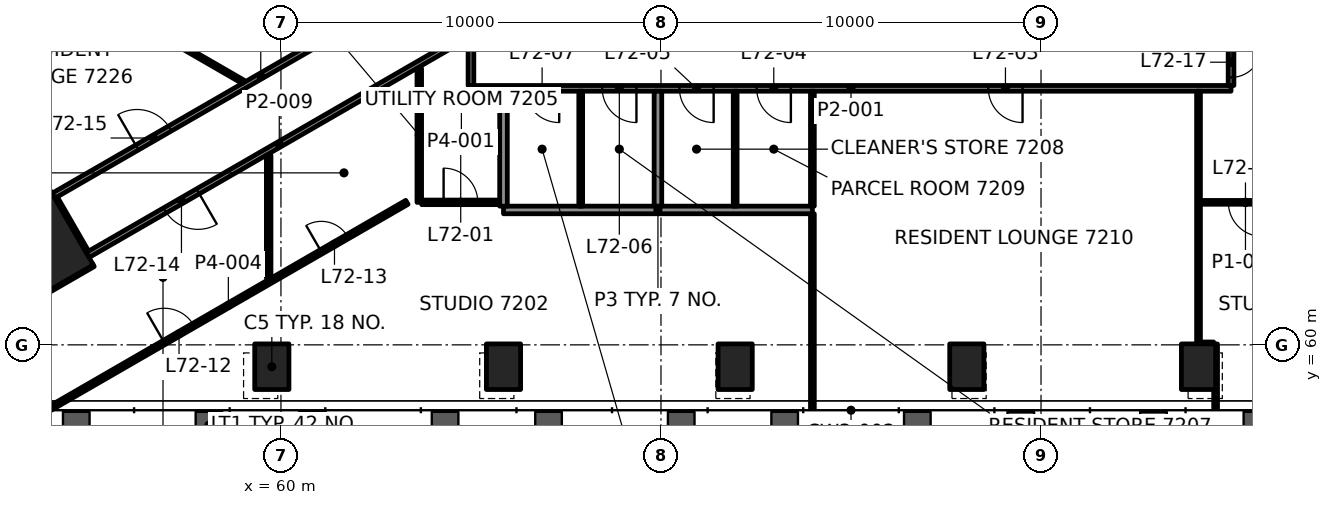
"""IFC4 building model, lengths in metres.
Left out: names, types, materials, properties, quantities, classifications, styles, units other than length and angle.
Written with IfcOpenShell. Run it as: python <this file> out.ifc"""

import sys

from ifc_helpers import new_model, si_unit, direction, frame, frame_2d, origin, origin_2d, place, context, subcontext, project, spatial, rectangle, hollow_rectangle, extrude, element, fill, save


model = new_model("IFC4")
c1 = context("Model", 3, precision=1e-05, world=origin(), true_north=direction((0.0, 1.0)))
c2 = subcontext(c1, "Body", "Model", "MODEL_VIEW")
j1 = project(units=[si_unit("LENGTHUNIT", "METRE"), si_unit("PLANEANGLEUNIT", "RADIAN")], contexts=[c1])
p1 = place(None, origin())
s1 = spatial("IfcSite", under=j1, at=p1, CompositionType="ELEMENT")
p2 = place(p1, origin())
s2 = spatial("IfcBuilding", under=s1, at=p2, CompositionType="ELEMENT")
p3 = place(p2, frame((0.0, 0.0, 298.6)))
s3 = spatial("IfcBuildingStorey", under=s2, at=p3, CompositionType="ELEMENT", Elevation=298.6)
p4 = place(p3, frame((53.423, 62.542, 0.0), z_axis=(0.0, 0.0, 1.0), x_axis=(0.5, -0.866025403784, 0.0)))
e1 = element("IfcColumn", 1, at=p4, inside=s3, PredefinedType="COLUMN", context=c2, shape_type="SweptSolid", body=[
    extrude(rectangle(XDim=2.4, YDim=2.4, at=origin_2d()), origin(), (0.0, 0.0, 1.0), 3.5),
])
for number, where, z_axis, x_axis in (
    (2, (59.76, 59.425, -0.0), (0.0, 0.0, 1.0), (1.0, 0.0, 0.0)),
    (3, (65.856, 59.425, -0.0), (0.0, 0.0, 1.0), (1.0, 0.0, 0.0)),
    (4, (71.952, 59.425, -0.0), (0.0, 0.0, 1.0), (1.0, 0.0, 0.0)),
    (5, (78.048, 59.425, -0.0), (0.0, 0.0, 1.0), (1.0, 0.0, 0.0)),
    (6, (84.144, 59.425, -0.0), (0.0, 0.0, 1.0), (1.0, 0.0, 0.0)),
):
    element("IfcColumn", number, at=place(p3, frame(where, z_axis=z_axis, x_axis=x_axis)), inside=s3, PredefinedType="COLUMN", context=c2, shape_type="SweptSolid", body=[
        extrude(hollow_rectangle(XDim=0.9, YDim=1.2, WallThickness=0.06, at=origin_2d()), origin(), (0.0, 0.0, 1.0), 3.5),
    ])
p5 = place(p3, frame((84.194, 60.025, 0.0), z_axis=(0.0, 0.0, 1.0), x_axis=(1.0, 0.0, 0.0)))
e7 = element("IfcWall", 7, at=p5, inside=s3, PredefinedType="PARTITIONING", context=c2, shape_type="SweptSolid", body=[
    extrude(rectangle(XDim=0.347, YDim=0.1, at=frame_2d((0.173, 0.0))), origin(), (0.0, 0.0, 1.0), 2.7),
])
p6 = place(p3, frame((65.856, 63.55, 0.0), z_axis=(0.0, 0.0, 1.0), x_axis=(1.0, 0.0, 0.0)))
e8 = element("IfcWall", 8, at=p6, inside=s3, PredefinedType="PARTITIONING", context=c2, shape_type="SweptSolid", body=[
    extrude(rectangle(XDim=8.128, YDim=0.2, at=frame_2d((4.064, 0.0))), origin(), (0.0, 0.0, 1.0), 2.7),
])
p7 = place(p3, frame((63.704, 63.75, 0.0), z_axis=(0.0, 0.0, 1.0), x_axis=(1.0, 0.0, 0.0)))
e9 = element("IfcWall", 9, at=p7, inside=s3, PredefinedType="PARTITIONING", context=c2, shape_type="SweptSolid", body=[
    extrude(rectangle(XDim=2.052, YDim=0.12, at=frame_2d((1.026, 0.0))), origin(), (0.0, 0.0, 1.0), 2.7),
])
p8 = place(p7, frame((0.576, 0.0, 0.0)))
e10 = element("IfcOpeningElement", 10, at=p8, cuts=e9, PredefinedType="OPENING", context=c2, shape_type="SweptSolid", body=[
    extrude(rectangle(XDim=0.9, YDim=2.1, at=frame_2d((0.45, 1.05))), frame((0.0, 0.07, 0.0), z_axis=(0.0, -1.0, 0.0), x_axis=(1.0, 0.0, 0.0)), (0.0, 0.0, 1.0), 0.14),
])
p9 = place(p3, frame((86.566, 63.75, 0.0), z_axis=(0.0, 0.0, 1.0), x_axis=(-1.0, 0.0, 0.0)))
e11 = element("IfcWall", 11, at=p9, inside=s3, PredefinedType="PARTITIONING", context=c2, shape_type="SweptSolid", body=[
    extrude(rectangle(XDim=2.372, YDim=0.1, at=frame_2d((1.186, 0.0))), origin(), (0.0, 0.0, 1.0), 2.7),
])
p10 = place(p9, frame((0.736, 0.0, 0.0)))
e12 = element("IfcOpeningElement", 12, at=p10, cuts=e11, PredefinedType="OPENING", context=c2, shape_type="SweptSolid", body=[
    extrude(rectangle(XDim=0.9, YDim=2.1, at=frame_2d((0.45, 1.05))), frame((0.0, 0.06, 0.0), z_axis=(0.0, -1.0, 0.0), x_axis=(1.0, 0.0, 0.0)), (0.0, 0.0, 1.0), 0.12),
])
p11 = place(p3, frame((85.0, 66.75, 0.0), z_axis=(0.0, 0.0, 1.0), x_axis=(-1.0, 0.0, 0.0)))
e13 = element("IfcWall", 13, at=p11, inside=s3, PredefinedType="PARTITIONING", context=c2, shape_type="SweptSolid", body=[
    extrude(rectangle(XDim=20.0, YDim=0.15, at=frame_2d((10.0, 0.0))), origin(), (0.0, 0.0, 1.0), 2.7),
])
p12 = place(p11, frame((5.486, 0.0, 0.0)))
e14 = element("IfcOpeningElement", 14, at=p12, cuts=e13, PredefinedType="OPENING", context=c2, shape_type="SweptSolid", body=[
    extrude(rectangle(XDim=0.9, YDim=2.1, at=frame_2d((0.45, 1.05))), frame((0.0, 0.085, 0.0), z_axis=(0.0, -1.0, 0.0), x_axis=(1.0, 0.0, 0.0)), (0.0, 0.0, 1.0), 0.17),
])
p13 = place(p11, frame((11.582, 0.0, 0.0)))
e15 = element("IfcOpeningElement", 15, at=p13, cuts=e13, PredefinedType="OPENING", context=c2, shape_type="SweptSolid", body=[
    extrude(rectangle(XDim=0.9, YDim=2.1, at=frame_2d((0.45, 1.05))), frame((0.0, 0.085, 0.0), z_axis=(0.0, -1.0, 0.0), x_axis=(1.0, 0.0, 0.0)), (0.0, 0.0, 1.0), 0.17),
])
p14 = place(p11, frame((13.614, 0.0, 0.0)))
e16 = element("IfcOpeningElement", 16, at=p14, cuts=e13, PredefinedType="OPENING", context=c2, shape_type="SweptSolid", body=[
    extrude(rectangle(XDim=0.9, YDim=2.1, at=frame_2d((0.45, 1.05))), frame((0.0, 0.085, 0.0), z_axis=(0.0, -1.0, 0.0), x_axis=(1.0, 0.0, 0.0)), (0.0, 0.0, 1.0), 0.17),
])
p15 = place(p11, frame((15.646, 0.0, 0.0)))
e17 = element("IfcOpeningElement", 17, at=p15, cuts=e13, PredefinedType="OPENING", context=c2, shape_type="SweptSolid", body=[
    extrude(rectangle(XDim=0.9, YDim=2.1, at=frame_2d((0.45, 1.05))), frame((0.0, 0.085, 0.0), z_axis=(0.0, -1.0, 0.0), x_axis=(1.0, 0.0, 0.0)), (0.0, 0.0, 1.0), 0.17),
])
p16 = place(p11, frame((17.678, 0.0, 0.0)))
e18 = element("IfcOpeningElement", 18, at=p16, cuts=e13, PredefinedType="OPENING", context=c2, shape_type="SweptSolid", body=[
    extrude(rectangle(XDim=0.9, YDim=2.1, at=frame_2d((0.45, 1.05))), frame((0.0, 0.085, 0.0), z_axis=(0.0, -1.0, 0.0), x_axis=(1.0, 0.0, 0.0)), (0.0, 0.0, 1.0), 0.17),
])
p17 = place(p3, frame((53.917, 58.325, 0.0), z_axis=(0.0, 0.0, 1.0), x_axis=(0.8660274679, 0.499996424829, 0.0)))
e19 = element("IfcWall", 19, at=p17, inside=s3, PredefinedType="PARTITIONING", context=c2, shape_type="SweptSolid", body=[
    extrude(rectangle(XDim=10.851, YDim=0.12, at=frame_2d((5.425, 0.0))), origin(), (0.0, 0.0, 1.0), 2.7),
])
p18 = place(p17, frame((3.477, 0.0, 0.0)))
e20 = element("IfcOpeningElement", 20, at=p18, cuts=e19, PredefinedType="OPENING", context=c2, shape_type="SweptSolid", body=[
    extrude(rectangle(XDim=0.9, YDim=2.1, at=frame_2d((0.45, 1.05))), frame((0.0, 0.07, 0.0), z_axis=(0.0, -1.0, 0.0), x_axis=(1.0, 0.0, 0.0)), (0.0, 0.0, 1.0), 0.14),
])
p19 = place(p17, frame((8.25, 0.0, 0.0)))
e21 = element("IfcOpeningElement", 21, at=p19, cuts=e19, PredefinedType="OPENING", context=c2, shape_type="SweptSolid", body=[
    extrude(rectangle(XDim=0.8, YDim=2.1, at=frame_2d((0.4, 1.05))), frame((0.0, 0.07, 0.0), z_axis=(0.0, -1.0, 0.0), x_axis=(1.0, 0.0, 0.0)), (0.0, 0.0, 1.0), 0.14),
])
p20 = place(p3, frame((52.984, 60.904, 0.0), z_axis=(0.0, 0.0, 1.0), x_axis=(0.866011011868, 0.500024926702, 0.0)))
e22 = element("IfcWall", 22, at=p20, inside=s3, PredefinedType="PARTITIONING", context=c2, shape_type="SweptSolid", body=[
    extrude(rectangle(XDim=2.399, YDim=0.1, at=frame_2d((1.199, 0.0))), origin(), (0.0, 0.0, 1.0), 2.7),
])
p21 = place(p3, frame((65.0, 68.187, 0.0), z_axis=(0.0, 0.0, 1.0), x_axis=(-0.866026430432, -0.49999822179, 0.0)))
e23 = element("IfcWall", 23, at=p21, inside=s3, PredefinedType="PARTITIONING", context=c2, shape_type="SweptSolid", body=[
    extrude(rectangle(XDim=11.648, YDim=0.15, at=frame_2d((5.824, 0.0))), origin(), (0.0, 0.0, 1.0), 2.547),
])
p22 = place(p21, frame((8.296, 0.0, 0.0)))
e24 = element("IfcOpeningElement", 24, at=p22, cuts=e23, PredefinedType="OPENING", context=c2, shape_type="SweptSolid", body=[
    extrude(rectangle(XDim=1.0, YDim=2.1, at=frame_2d((0.5, 1.05))), frame((0.0, 0.085, 0.0), z_axis=(0.0, -1.0, 0.0), x_axis=(1.0, 0.0, 0.0)), (0.0, 0.0, 1.0), 0.17),
])
p23 = place(p3, frame((54.012, 63.922, 0.0), z_axis=(0.0, 0.0, 1.0), x_axis=(0.866028779199, 0.499994153564, 0.0)))
e25 = element("IfcWall", 25, at=p23, inside=s3, PredefinedType="PARTITIONING", context=c2, shape_type="SweptSolid", body=[
    extrude(rectangle(XDim=12.601, YDim=0.15, at=frame_2d((6.3, 0.0))), origin(), (0.0, 0.0, 1.0), 2.7),
])
p24 = place(p23, frame((2.542, 0.0, 0.0)))
e26 = element("IfcOpeningElement", 26, at=p24, cuts=e25, PredefinedType="OPENING", context=c2, shape_type="SweptSolid", body=[
    extrude(rectangle(XDim=1.0, YDim=2.1, at=frame_2d((0.5, 1.05))), frame((0.0, 0.085, 0.0), z_axis=(0.0, -1.0, 0.0), x_axis=(1.0, 0.0, 0.0)), (0.0, 0.0, 1.0), 0.17),
])
p25 = place(p23, frame((8.639, 0.0, 0.0)))
e27 = element("IfcOpeningElement", 27, at=p25, cuts=e25, PredefinedType="OPENING", context=c2, shape_type="SweptSolid", body=[
    extrude(rectangle(XDim=1.0, YDim=2.1, at=frame_2d((0.5, 1.05))), frame((0.0, 0.085, 0.0), z_axis=(0.0, -1.0, 0.0), x_axis=(1.0, 0.0, 0.0)), (0.0, 0.0, 1.0), 0.17),
])
p26 = place(p3, frame((85.0, 68.051, 0.0), z_axis=(0.0, 0.0, 1.0), x_axis=(0.0, -1.0, 0.0)))
e28 = element("IfcWall", 28, at=p26, inside=s3, PredefinedType="PARTITIONING", context=c2, shape_type="SweptSolid", body=[
    extrude(rectangle(XDim=1.226, YDim=0.15, at=frame_2d((0.613, 0.0))), origin(), (0.0, 0.0, 1.0), 2.547),
])
p27 = place(p26, frame((0.213, 0.0, 0.0)))
e29 = element("IfcOpeningElement", 29, at=p27, cuts=e28, PredefinedType="OPENING", context=c2, shape_type="SweptSolid", body=[
    extrude(rectangle(XDim=0.8, YDim=2.1, at=frame_2d((0.4, 1.05))), frame((0.0, 0.085, 0.0), z_axis=(0.0, -1.0, 0.0), x_axis=(1.0, 0.0, 0.0)), (0.0, 0.0, 1.0), 0.17),
])
p28 = place(p3, frame((84.594, 58.325, 0.0), z_axis=(0.0, 0.0, 1.0), x_axis=(0.0, 1.0, 0.0)))
e30 = element("IfcWall", 30, at=p28, inside=s3, PredefinedType="PARTITIONING", context=c2, shape_type="SweptSolid", body=[
    extrude(rectangle(XDim=1.697, YDim=0.1, at=frame_2d((0.849, 0.0))), origin(), (0.0, 0.0, 1.0), 2.7),
])
p29 = place(p3, frame((84.144, 60.025, 0.0), z_axis=(0.0, 0.0, 1.0), x_axis=(0.0, 1.0, 0.0)))
e31 = element("IfcWall", 31, at=p29, inside=s3, PredefinedType="PARTITIONING", context=c2, shape_type="SweptSolid", body=[
    extrude(rectangle(XDim=6.65, YDim=0.1, at=frame_2d((3.325, 0.0))), origin(), (0.0, 0.0, 1.0), 2.7),
])
p30 = place(p3, frame((73.984, 58.325, 0.0), z_axis=(0.0, 0.0, 1.0), x_axis=(0.0, 1.0, 0.0)))
e32 = element("IfcWall", 32, at=p30, inside=s3, PredefinedType="PARTITIONING", context=c2, shape_type="SweptSolid", body=[
    extrude(rectangle(XDim=5.125, YDim=0.1, at=frame_2d((2.562, 0.0))), origin(), (0.0, 0.0, 1.0), 2.688),
])
p31 = place(p3, frame((71.952, 63.65, 0.0), z_axis=(0.0, 0.0, 1.0), x_axis=(0.0, 1.0, 0.0)))
e33 = element("IfcWall", 33, at=p31, inside=s3, PredefinedType="PARTITIONING", context=c2, shape_type="SweptSolid", body=[
    extrude(rectangle(XDim=3.025, YDim=0.1, at=frame_2d((1.513, 0.0))), origin(), (0.0, 0.0, 1.0), 2.7),
])
p32 = place(p3, frame((69.92, 63.65, 0.0), z_axis=(0.0, 0.0, 1.0), x_axis=(0.0, 1.0, 0.0)))
e34 = element("IfcWall", 34, at=p32, inside=s3, PredefinedType="PARTITIONING", context=c2, shape_type="SweptSolid", body=[
    extrude(rectangle(XDim=3.025, YDim=0.2, at=frame_2d((1.513, 0.0))), origin(), (0.0, 0.0, 1.0), 2.7),
])
p33 = place(p3, frame((67.888, 63.65, 0.0), z_axis=(0.0, 0.0, 1.0), x_axis=(0.0, 1.0, 0.0)))
e35 = element("IfcWall", 35, at=p33, inside=s3, PredefinedType="PARTITIONING", context=c2, shape_type="SweptSolid", body=[
    extrude(rectangle(XDim=3.025, YDim=0.1, at=frame_2d((1.513, 0.0))), origin(), (0.0, 0.0, 1.0), 2.7),
])
p34 = place(p3, frame((65.856, 63.65, 0.0), z_axis=(0.0, 0.0, 1.0), x_axis=(0.0, 1.0, 0.0)))
e36 = element("IfcWall", 36, at=p34, inside=s3, PredefinedType="PARTITIONING", context=c2, shape_type="SweptSolid", body=[
    extrude(rectangle(XDim=3.025, YDim=0.2, at=frame_2d((1.513, 0.0))), origin(), (0.0, 0.0, 1.0), 2.7),
])
p35 = place(p3, frame((65.0, 66.825, 0.0), z_axis=(0.0, 0.0, 1.0), x_axis=(0.0, 1.0, 0.0)))
e37 = element("IfcWall", 37, at=p35, inside=s3, PredefinedType="PARTITIONING", context=c2, shape_type="SweptSolid", body=[
    extrude(rectangle(XDim=1.226, YDim=0.15, at=frame_2d((0.613, 0.0))), origin(), (0.0, 0.0, 1.0), 2.547),
])
p36 = place(p3, frame((63.64, 63.75, 0.0), z_axis=(0.0, 0.0, 1.0), x_axis=(0.0, 1.0, 0.0)))
e38 = element("IfcWall", 38, at=p36, inside=s3, PredefinedType="PARTITIONING", context=c2, shape_type="SweptSolid", body=[
    extrude(rectangle(XDim=3.525, YDim=0.12, at=frame_2d((1.763, 0.0))), origin(), (0.0, 0.0, 1.0), 2.547),
])
p37 = place(p3, frame((59.677, 61.759, 0.0), z_axis=(0.0, 0.0, 1.0), x_axis=(0.0, 1.0, 0.0)))
e39 = element("IfcWall", 39, at=p37, inside=s3, PredefinedType="PARTITIONING", context=c2, shape_type="SweptSolid", body=[
    extrude(rectangle(XDim=3.228, YDim=0.12, at=frame_2d((1.614, 0.0))), origin(), (0.0, 0.0, 1.0), 2.7),
])
p38 = place(p3, frame((54.872, 62.433, 0.0), z_axis=(0.0, 0.0, 1.0), x_axis=(-0.499988108725, 0.866032269107, 0.0)))
e40 = element("IfcWall", 40, at=p38, inside=s3, PredefinedType="PARTITIONING", context=c2, shape_type="SweptSolid", body=[
    extrude(rectangle(XDim=1.644, YDim=0.15, at=frame_2d((0.822, 0.0))), origin(), (0.0, 0.0, 1.0), 2.547),
])
p39 = place(p3, frame((85.075, 70.222, 0.0), z_axis=(0.0, 0.0, 1.0), x_axis=(0.866023935413, -0.500002543286, 0.0)))
e41 = element("IfcWall", 41, at=p39, inside=s3, PredefinedType="PARTITIONING", context=c2, shape_type="SweptSolid", body=[
    extrude(rectangle(XDim=12.601, YDim=0.15, at=frame_2d((6.3, 0.0))), origin(), (0.0, 0.0, 1.0), 2.7),
])
p40 = place(p39, frame((9.249, 0.0, 0.0)))
e42 = element("IfcOpeningElement", 42, at=p40, cuts=e41, PredefinedType="OPENING", context=c2, shape_type="SweptSolid", body=[
    extrude(rectangle(XDim=1.0, YDim=2.1, at=frame_2d((0.5, 1.05))), frame((0.0, 0.085, 0.0), z_axis=(0.0, -1.0, 0.0), x_axis=(1.0, 0.0, 0.0)), (0.0, 0.0, 1.0), 0.17),
])
p41 = place(p3, frame((95.088, 62.363, 0.0), z_axis=(0.0, 0.0, 1.0), x_axis=(-0.866026430432, 0.49999822179, 0.0)))
e43 = element("IfcWall", 43, at=p41, inside=s3, PredefinedType="PARTITIONING", context=c2, shape_type="SweptSolid", body=[
    extrude(rectangle(XDim=11.648, YDim=0.15, at=frame_2d((5.824, 0.0))), origin(), (0.0, 0.0, 1.0), 2.547),
])
p42 = place(p3, frame((59.005, 66.921, 0.0), z_axis=(0.0, 0.0, 1.0), x_axis=(-0.866022552607, 0.500004938352, 0.0)))
e44 = element("IfcWall", 44, at=p42, inside=s3, PredefinedType="PARTITIONING", context=c2, shape_type="SweptSolid", body=[
    extrude(rectangle(XDim=5.162, YDim=0.1, at=frame_2d((2.581, 0.0))), origin(), (0.0, 0.0, 1.0), 2.7),
])
p43 = place(p3, frame((73.984, 63.65, 0.0), z_axis=(0.0, 0.0, 1.0), x_axis=(0.0, 1.0, 0.0)))
e45 = element("IfcWall", 45, at=p43, inside=s3, PredefinedType="PARTITIONING", context=c2, shape_type="SweptSolid", body=[
    extrude(rectangle(XDim=3.025, YDim=0.1, at=frame_2d((1.513, 0.0))), origin(), (0.0, 0.0, 1.0), 2.7),
])
p44 = place(p8, origin())
e46 = element("IfcDoor", 46, at=p44, inside=s3, OperationType="SINGLE_SWING_LEFT", PredefinedType="DOOR", context=c2, shape_type="SweptSolid", body=[
    extrude(rectangle(XDim=0.9, YDim=2.1, at=frame_2d((0.45, 1.05))), frame((0.0, 0.025, 0.0), z_axis=(0.0, -1.0, 0.0), x_axis=(1.0, 0.0, 0.0)), (0.0, 0.0, 1.0), 0.05),
])
fill(e10, e46)
p45 = place(p10, origin())
e47 = element("IfcDoor", 47, at=p45, inside=s3, OperationType="SINGLE_SWING_LEFT", PredefinedType="DOOR", context=c2, shape_type="SweptSolid", body=[
    extrude(rectangle(XDim=0.9, YDim=2.1, at=frame_2d((0.45, 1.05))), frame((0.0, 0.025, 0.0), z_axis=(0.0, -1.0, 0.0), x_axis=(1.0, 0.0, 0.0)), (0.0, 0.0, 1.0), 0.05),
])
fill(e12, e47)
p46 = place(p12, origin())
e48 = element("IfcDoor", 48, at=p46, inside=s3, OperationType="SINGLE_SWING_RIGHT", PredefinedType="DOOR", context=c2, shape_type="SweptSolid", body=[
    extrude(rectangle(XDim=0.9, YDim=2.1, at=frame_2d((0.45, 1.05))), frame((0.0, 0.025, 0.0), z_axis=(0.0, -1.0, 0.0), x_axis=(1.0, 0.0, 0.0)), (0.0, 0.0, 1.0), 0.05),
])
fill(e14, e48)
p47 = place(p13, origin())
e49 = element("IfcDoor", 49, at=p47, inside=s3, OperationType="SINGLE_SWING_LEFT", PredefinedType="DOOR", context=c2, shape_type="SweptSolid", body=[
    extrude(rectangle(XDim=0.9, YDim=2.1, at=frame_2d((0.45, 1.05))), frame((0.0, 0.025, 0.0), z_axis=(0.0, -1.0, 0.0), x_axis=(1.0, 0.0, 0.0)), (0.0, 0.0, 1.0), 0.05),
])
fill(e15, e49)
p48 = place(p14, origin())
e50 = element("IfcDoor", 50, at=p48, inside=s3, OperationType="SINGLE_SWING_RIGHT", PredefinedType="DOOR", context=c2, shape_type="SweptSolid", body=[
    extrude(rectangle(XDim=0.9, YDim=2.1, at=frame_2d((0.45, 1.05))), frame((0.0, 0.025, 0.0), z_axis=(0.0, -1.0, 0.0), x_axis=(1.0, 0.0, 0.0)), (0.0, 0.0, 1.0), 0.05),
])
fill(e16, e50)
p49 = place(p15, origin())
e51 = element("IfcDoor", 51, at=p49, inside=s3, OperationType="SINGLE_SWING_LEFT", PredefinedType="DOOR", context=c2, shape_type="SweptSolid", body=[
    extrude(rectangle(XDim=0.9, YDim=2.1, at=frame_2d((0.45, 1.05))), frame((0.0, 0.025, 0.0), z_axis=(0.0, -1.0, 0.0), x_axis=(1.0, 0.0, 0.0)), (0.0, 0.0, 1.0), 0.05),
])
fill(e17, e51)
p50 = place(p16, origin())
e52 = element("IfcDoor", 52, at=p50, inside=s3, OperationType="SINGLE_SWING_RIGHT", PredefinedType="DOOR", context=c2, shape_type="SweptSolid", body=[
    extrude(rectangle(XDim=0.9, YDim=2.1, at=frame_2d((0.45, 1.05))), frame((0.0, 0.025, 0.0), z_axis=(0.0, -1.0, 0.0), x_axis=(1.0, 0.0, 0.0)), (0.0, 0.0, 1.0), 0.05),
])
fill(e18, e52)
p51 = place(p18, origin())
e53 = element("IfcDoor", 53, at=p51, inside=s3, OperationType="SINGLE_SWING_RIGHT", PredefinedType="DOOR", context=c2, shape_type="SweptSolid", body=[
    extrude(rectangle(XDim=0.9, YDim=2.1, at=frame_2d((0.45, 1.05))), frame((0.0, 0.025, 0.0), z_axis=(0.0, -1.0, 0.0), x_axis=(1.0, 0.0, 0.0)), (0.0, 0.0, 1.0), 0.05),
])
fill(e20, e53)
p52 = place(p19, origin())
e54 = element("IfcDoor", 54, at=p52, inside=s3, OperationType="SINGLE_SWING_RIGHT", PredefinedType="DOOR", context=c2, shape_type="SweptSolid", body=[
    extrude(rectangle(XDim=0.8, YDim=2.1, at=frame_2d((0.4, 1.05))), frame((0.0, 0.025, 0.0), z_axis=(0.0, -1.0, 0.0), x_axis=(1.0, 0.0, 0.0)), (0.0, 0.0, 1.0), 0.05),
])
fill(e21, e54)
p53 = place(p22, origin())
e55 = element("IfcDoor", 55, at=p53, inside=s3, OperationType="SINGLE_SWING_RIGHT", PredefinedType="DOOR", context=c2, shape_type="SweptSolid", body=[
    extrude(rectangle(XDim=1.0, YDim=2.1, at=frame_2d((0.5, 1.05))), frame((0.0, 0.025, 0.0), z_axis=(0.0, -1.0, 0.0), x_axis=(1.0, 0.0, 0.0)), (0.0, 0.0, 1.0), 0.05),
])
fill(e24, e55)
p54 = place(p24, origin())
e56 = element("IfcDoor", 56, at=p54, inside=s3, OperationType="SINGLE_SWING_LEFT", PredefinedType="DOOR", context=c2, shape_type="SweptSolid", body=[
    extrude(rectangle(XDim=1.0, YDim=2.1, at=frame_2d((0.5, 1.05))), frame((0.0, 0.025, 0.0), z_axis=(0.0, -1.0, 0.0), x_axis=(1.0, 0.0, 0.0)), (0.0, 0.0, 1.0), 0.05),
])
fill(e26, e56)
p55 = place(p27, origin())
e57 = element("IfcDoor", 57, at=p55, inside=s3, OperationType="SINGLE_SWING_RIGHT", PredefinedType="DOOR", context=c2, shape_type="SweptSolid", body=[
    extrude(rectangle(XDim=0.8, YDim=2.1, at=frame_2d((0.4, 1.05))), frame((0.0, 0.025, 0.0), z_axis=(0.0, -1.0, 0.0), x_axis=(1.0, 0.0, 0.0)), (0.0, 0.0, 1.0), 0.05),
])
fill(e29, e57)
save(model, sys.argv[1])
